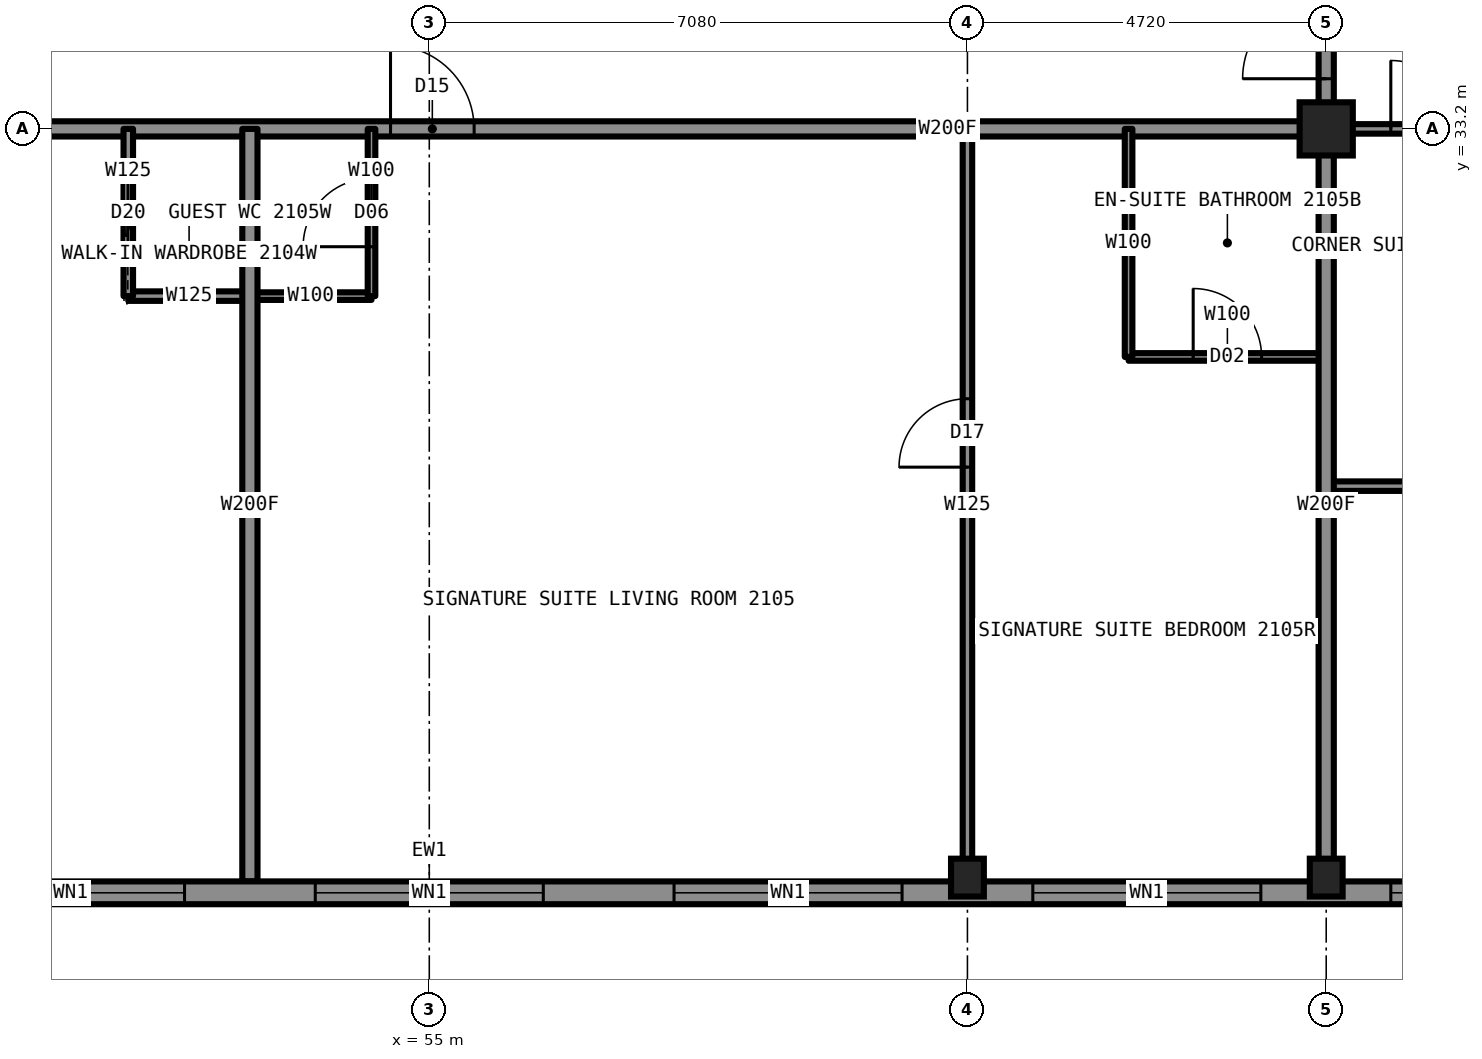
"""IFC4 building model, lengths in metres.
Left out: names, types, materials, properties, quantities, classifications, styles, units other than length and angle.
Written with IfcOpenShell. Run it as: python <this file> out.ifc"""

import sys

from ifc_helpers import new_model, si_unit, direction, frame, frame_2d, origin, origin_2d, place, context, subcontext, project, spatial, rectangle, hollow_rectangle, i_section, extrude, element, fill, save


model = new_model("IFC4")
c1 = context("Model", 3, precision=1e-05, world=origin(), true_north=direction((0.0, 1.0)))
c2 = subcontext(c1, "Body", "Model", "MODEL_VIEW")
j1 = project(units=[si_unit("LENGTHUNIT", "METRE"), si_unit("PLANEANGLEUNIT", "RADIAN")], contexts=[c1])
p1 = place(None, origin())
s1 = spatial("IfcSite", under=j1, at=p1, CompositionType="ELEMENT")
p2 = place(p1, origin())
s2 = spatial("IfcBuilding", under=s1, at=p2, CompositionType="ELEMENT")
p3 = place(p2, frame((0.0, 0.0, 81.0)))
s3 = spatial("IfcBuildingStorey", under=s2, at=p3, CompositionType="ELEMENT", Elevation=81.0)
for number, where, z_axis, x_axis in (
    (1, (62.08, 23.35, 0.0), (0.0, 0.0, 1.0), (1.0, 0.0, 0.0)),
    (2, (66.8, 23.35, 0.0), (0.0, 0.0, 1.0), (1.0, 0.0, 0.0)),
):
    element("IfcColumn", number, at=place(p3, frame(where, z_axis=z_axis, x_axis=x_axis)), inside=s3, PredefinedType="COLUMN", context=c2, shape_type="SweptSolid", body=[
        extrude(i_section(OverallWidth=0.432, OverallDepth=0.498, WebThickness=0.056, FlangeThickness=0.089, at=origin_2d()), origin(), (0.0, 0.0, 1.0), 3.5),
    ])
p4 = place(p3, frame((66.8, 33.2, 0.0), z_axis=(0.0, 0.0, 1.0), x_axis=(1.0, 0.0, 0.0)))
e3 = element("IfcColumn", 3, at=p4, inside=s3, PredefinedType="COLUMN", context=c2, shape_type="SweptSolid", body=[
    extrude(hollow_rectangle(XDim=0.7, YDim=0.7, WallThickness=0.06, at=origin_2d()), origin(), (0.0, 0.0, 1.0), 3.5),
])
p5 = place(p3, frame((43.2, 33.2, 0.0), z_axis=(0.0, 0.0, 1.0), x_axis=(1.0, 0.0, 0.0)))
e4 = element("IfcWall", 4, at=p5, inside=s3, PredefinedType="PARTITIONING", context=c2, shape_type="SweptSolid", body=[
    extrude(rectangle(XDim=23.6, YDim=0.2, at=frame_2d((11.8, 0.0))), origin(), (0.0, 0.0, 1.0), 3.33),
])
p6 = place(p5, frame((3.0, 0.0, 0.0)))
e5 = element("IfcOpeningElement", 5, at=p6, cuts=e4, PredefinedType="OPENING", context=c2, shape_type="SweptSolid", body=[
    extrude(rectangle(XDim=1.0, YDim=2.2, at=frame_2d((0.5, 1.1))), frame((0.0, 0.11, 0.0), z_axis=(0.0, -1.0, 0.0), x_axis=(1.0, 0.0, 0.0)), (0.0, 0.0, 1.0), 0.22),
])
p7 = place(p5, frame((11.29, 0.0, 0.0)))
e6 = element("IfcOpeningElement", 6, at=p7, cuts=e4, PredefinedType="OPENING", context=c2, shape_type="SweptSolid", body=[
    extrude(rectangle(XDim=1.1, YDim=2.2, at=frame_2d((0.55, 1.1))), frame((0.0, 0.11, 0.0), z_axis=(0.0, -1.0, 0.0), x_axis=(1.0, 0.0, 0.0)), (0.0, 0.0, 1.0), 0.22),
])
p8 = place(p3, frame((66.8, 33.2, 0.0), z_axis=(0.0, 0.0, 1.0), x_axis=(1.0, 0.0, 0.0)))
e7 = element("IfcWall", 7, at=p8, inside=s3, PredefinedType="PARTITIONING", context=c2, shape_type="SweptSolid", body=[
    extrude(rectangle(XDim=9.9, YDim=0.125, at=frame_2d((4.95, 0.0))), origin(), (0.0, 0.0, 1.0), 2.573),
])
p9 = place(p8, frame((0.85, 0.0, 0.0)))
e8 = element("IfcOpeningElement", 8, at=p9, cuts=e7, PredefinedType="OPENING", context=c2, shape_type="SweptSolid", body=[
    extrude(rectangle(XDim=0.9, YDim=2.2, at=frame_2d((0.45, 1.1))), frame((0.0, 0.073, 0.0), z_axis=(0.0, -1.0, 0.0), x_axis=(1.0, 0.0, 0.0)), (0.0, 0.0, 1.0), 0.145),
])
p10 = place(p3, frame((52.64, 31.0, 0.0), z_axis=(0.0, 0.0, 1.0), x_axis=(1.0, 0.0, 0.0)))
e9 = element("IfcWall", 9, at=p10, inside=s3, PredefinedType="PARTITIONING", context=c2, shape_type="SweptSolid", body=[
    extrude(rectangle(XDim=1.6, YDim=0.1, at=frame_2d((0.8, 0.0))), origin(), (0.0, 0.0, 1.0), 3.33),
])
p11 = place(p3, frame((51.04, 31.0, 0.0), z_axis=(0.0, 0.0, 1.0), x_axis=(1.0, 0.0, 0.0)))
e10 = element("IfcWall", 10, at=p11, inside=s3, PredefinedType="PARTITIONING", context=c2, shape_type="SweptSolid", body=[
    extrude(rectangle(XDim=1.6, YDim=0.125, at=frame_2d((0.8, 0.0))), origin(), (0.0, 0.0, 1.0), 3.33),
])
p12 = place(p3, frame((64.2, 30.2, 0.0), z_axis=(0.0, 0.0, 1.0), x_axis=(1.0, 0.0, 0.0)))
e11 = element("IfcWall", 11, at=p12, inside=s3, PredefinedType="PARTITIONING", context=c2, shape_type="SweptSolid", body=[
    extrude(rectangle(XDim=2.6, YDim=0.1, at=frame_2d((1.3, 0.0))), origin(), (0.0, 0.0, 1.0), 3.33),
])
p13 = place(p12, frame((0.85, 0.0, 0.0)))
e12 = element("IfcOpeningElement", 12, at=p13, cuts=e11, PredefinedType="OPENING", context=c2, shape_type="SweptSolid", body=[
    extrude(rectangle(XDim=0.9, YDim=2.1, at=frame_2d((0.45, 1.05))), frame((0.0, 0.06, 0.0), z_axis=(0.0, -1.0, 0.0), x_axis=(1.0, 0.0, 0.0)), (0.0, 0.0, 1.0), 0.12),
])
p14 = place(p3, frame((66.8, 28.5, 0.0), z_axis=(0.0, 0.0, 1.0), x_axis=(1.0, 0.0, 0.0)))
e13 = element("IfcWall", 13, at=p14, inside=s3, PredefinedType="PARTITIONING", context=c2, shape_type="SweptSolid", body=[
    extrude(rectangle(XDim=9.894, YDim=0.125, at=frame_2d((4.947, 0.0))), origin(), (0.0, 0.0, 1.0), 3.33),
])
p15 = place(p14, frame((1.75, 0.0, 0.0)))
e14 = element("IfcOpeningElement", 14, at=p15, cuts=e13, PredefinedType="OPENING", context=c2, shape_type="SweptSolid", body=[
    extrude(rectangle(XDim=0.9, YDim=2.2, at=frame_2d((0.45, 1.1))), frame((0.0, 0.073, 0.0), z_axis=(0.0, -1.0, 0.0), x_axis=(1.0, 0.0, 0.0)), (0.0, 0.0, 1.0), 0.145),
])
p16 = place(p3, frame((54.24, 31.0, 0.0), z_axis=(0.0, 0.0, 1.0), x_axis=(0.0, 1.0, 0.0)))
e15 = element("IfcWall", 15, at=p16, inside=s3, PredefinedType="PARTITIONING", context=c2, shape_type="SweptSolid", body=[
    extrude(rectangle(XDim=2.2, YDim=0.1, at=frame_2d((1.1, 0.0))), origin(), (0.0, 0.0, 1.0), 3.33),
])
p17 = place(p16, frame((0.65, 0.0, 0.0)))
e16 = element("IfcOpeningElement", 16, at=p17, cuts=e15, PredefinedType="OPENING", context=c2, shape_type="SweptSolid", body=[
    extrude(rectangle(XDim=0.9, YDim=2.1, at=frame_2d((0.45, 1.05))), frame((0.0, 0.06, 0.0), z_axis=(0.0, -1.0, 0.0), x_axis=(1.0, 0.0, 0.0)), (0.0, 0.0, 1.0), 0.12),
])
p18 = place(p3, frame((52.64, 23.3, 0.0), z_axis=(0.0, 0.0, 1.0), x_axis=(0.0, 1.0, 0.0)))
e17 = element("IfcWall", 17, at=p18, inside=s3, PredefinedType="PARTITIONING", context=c2, shape_type="SweptSolid", body=[
    extrude(rectangle(XDim=9.9, YDim=0.2, at=frame_2d((4.95, 0.0))), origin(), (0.0, 0.0, 1.0), 3.33),
])
p19 = place(p3, frame((51.04, 31.0, 0.0), z_axis=(0.0, 0.0, 1.0), x_axis=(0.0, 1.0, 0.0)))
e18 = element("IfcWall", 18, at=p19, inside=s3, PredefinedType="PARTITIONING", context=c2, shape_type="SweptSolid", body=[
    extrude(rectangle(XDim=2.2, YDim=0.125, at=frame_2d((1.1, 0.0))), origin(), (0.0, 0.0, 1.0), 3.33),
])
p20 = place(p19, frame((0.7, 0.0, 0.0)))
e19 = element("IfcOpeningElement", 19, at=p20, cuts=e18, PredefinedType="OPENING", context=c2, shape_type="SweptSolid", body=[
    extrude(rectangle(XDim=0.8, YDim=2.1, at=frame_2d((0.4, 1.05))), frame((0.0, 0.073, 0.0), z_axis=(0.0, -1.0, 0.0), x_axis=(1.0, 0.0, 0.0)), (0.0, 0.0, 1.0), 0.145),
])
p21 = place(p3, frame((66.8, 33.2, 0.0), z_axis=(0.0, 0.0, 1.0), x_axis=(0.0, 1.0, 0.0)))
e20 = element("IfcWall", 20, at=p21, inside=s3, PredefinedType="PARTITIONING", context=c2, shape_type="SweptSolid", body=[
    extrude(rectangle(XDim=23.6, YDim=0.2, at=frame_2d((11.8, 0.0))), origin(), (0.0, 0.0, 1.0), 3.33),
])
p22 = place(p21, frame((7.72, 0.0, 0.0)))
e21 = element("IfcOpeningElement", 21, at=p22, cuts=e20, PredefinedType="OPENING", context=c2, shape_type="SweptSolid", body=[
    extrude(rectangle(XDim=1.0, YDim=2.2, at=frame_2d((0.5, 1.1))), frame((0.0, 0.11, 0.0), z_axis=(0.0, -1.0, 0.0), x_axis=(1.0, 0.0, 0.0)), (0.0, 0.0, 1.0), 0.22),
])
p23 = place(p21, frame((16.42, 0.0, 0.0)))
e22 = element("IfcOpeningElement", 22, at=p23, cuts=e20, PredefinedType="OPENING", context=c2, shape_type="SweptSolid", body=[
    extrude(rectangle(XDim=1.0, YDim=2.2, at=frame_2d((0.5, 1.1))), frame((0.0, 0.11, 0.0), z_axis=(0.0, -1.0, 0.0), x_axis=(1.0, 0.0, 0.0)), (0.0, 0.0, 1.0), 0.22),
])
p24 = place(p21, frame((21.85, 0.0, 0.0)))
e23 = element("IfcOpeningElement", 23, at=p24, cuts=e20, PredefinedType="OPENING", context=c2, shape_type="SweptSolid", body=[
    extrude(rectangle(XDim=1.1, YDim=2.2, at=frame_2d((0.55, 1.1))), frame((0.0, 0.11, 0.0), z_axis=(0.0, -1.0, 0.0), x_axis=(1.0, 0.0, 0.0)), (0.0, 0.0, 1.0), 0.22),
])
p25 = place(p21, frame((0.66, 0.0, 0.0)))
e24 = element("IfcOpeningElement", 24, at=p25, cuts=e20, PredefinedType="OPENING", context=c2, shape_type="SweptSolid", body=[
    extrude(rectangle(XDim=1.1, YDim=2.2, at=frame_2d((0.55, 1.1))), frame((0.0, 0.11, 0.0), z_axis=(0.0, -1.0, 0.0), x_axis=(1.0, 0.0, 0.0)), (0.0, 0.0, 1.0), 0.22),
])
p26 = place(p3, frame((66.8, 23.3, 0.0), z_axis=(0.0, 0.0, 1.0), x_axis=(0.0, 1.0, 0.0)))
e25 = element("IfcWall", 25, at=p26, inside=s3, PredefinedType="PARTITIONING", context=c2, shape_type="SweptSolid", body=[
    extrude(rectangle(XDim=9.9, YDim=0.2, at=frame_2d((4.95, 0.0))), origin(), (0.0, 0.0, 1.0), 2.573),
])
p27 = place(p3, frame((62.08, 23.3, 0.0), z_axis=(0.0, 0.0, 1.0), x_axis=(0.0, 1.0, 0.0)))
e26 = element("IfcWall", 26, at=p27, inside=s3, PredefinedType="PARTITIONING", context=c2, shape_type="SweptSolid", body=[
    extrude(rectangle(XDim=9.9, YDim=0.125, at=frame_2d((4.95, 0.0))), origin(), (0.0, 0.0, 1.0), 2.573),
])
p28 = place(p27, frame((5.45, 0.0, 0.0)))
e27 = element("IfcOpeningElement", 27, at=p28, cuts=e26, PredefinedType="OPENING", context=c2, shape_type="SweptSolid", body=[
    extrude(rectangle(XDim=0.9, YDim=2.2, at=frame_2d((0.45, 1.1))), frame((0.0, 0.073, 0.0), z_axis=(0.0, -1.0, 0.0), x_axis=(1.0, 0.0, 0.0)), (0.0, 0.0, 1.0), 0.145),
])
p29 = place(p3, frame((64.2, 30.2, 0.0), z_axis=(0.0, 0.0, 1.0), x_axis=(0.0, 1.0, 0.0)))
e28 = element("IfcWall", 28, at=p29, inside=s3, PredefinedType="PARTITIONING", context=c2, shape_type="SweptSolid", body=[
    extrude(rectangle(XDim=3.0, YDim=0.1, at=frame_2d((1.5, 0.0))), origin(), (0.0, 0.0, 1.0), 3.33),
])
p30 = place(p3, frame((38.5, 23.15, 0.0), z_axis=(0.0, 0.0, 1.0), x_axis=(1.0, 0.0, 0.0)))
e29 = element("IfcWall", 29, at=p30, inside=s3, PredefinedType="SOLIDWALL", context=c2, shape_type="SweptSolid", body=[
    extrude(rectangle(XDim=33.0, YDim=0.3, at=frame_2d((16.5, 0.0))), origin(), (0.0, 0.0, 1.0), 2.63),
])
p31 = place(p30, frame((0.85, 0.0, 0.5)))
e30 = element("IfcOpeningElement", 30, at=p31, cuts=e29, PredefinedType="OPENING", context=c2, shape_type="SweptSolid", body=[
    extrude(rectangle(XDim=3.0, YDim=2.0, at=frame_2d((1.5, 1.0))), frame((0.0, 0.16, 0.0), z_axis=(0.0, -1.0, 0.0), x_axis=(1.0, 0.0, 0.0)), (0.0, 0.0, 1.0), 0.32),
])
p32 = place(p30, frame((5.56, 0.0, 0.5)))
e31 = element("IfcOpeningElement", 31, at=p32, cuts=e29, PredefinedType="OPENING", context=c2, shape_type="SweptSolid", body=[
    extrude(rectangle(XDim=3.0, YDim=2.0, at=frame_2d((1.5, 1.0))), frame((0.0, 0.16, 0.0), z_axis=(0.0, -1.0, 0.0), x_axis=(1.0, 0.0, 0.0)), (0.0, 0.0, 1.0), 0.32),
])
p33 = place(p30, frame((10.28, 0.0, 0.5)))
e32 = element("IfcOpeningElement", 32, at=p33, cuts=e29, PredefinedType="OPENING", context=c2, shape_type="SweptSolid", body=[
    extrude(rectangle(XDim=3.0, YDim=2.0, at=frame_2d((1.5, 1.0))), frame((0.0, 0.16, 0.0), z_axis=(0.0, -1.0, 0.0), x_axis=(1.0, 0.0, 0.0)), (0.0, 0.0, 1.0), 0.32),
])
p34 = place(p30, frame((15.0, 0.0, 0.5)))
e33 = element("IfcOpeningElement", 33, at=p34, cuts=e29, PredefinedType="OPENING", context=c2, shape_type="SweptSolid", body=[
    extrude(rectangle(XDim=3.0, YDim=2.0, at=frame_2d((1.5, 1.0))), frame((0.0, 0.16, 0.0), z_axis=(0.0, -1.0, 0.0), x_axis=(1.0, 0.0, 0.0)), (0.0, 0.0, 1.0), 0.32),
])
p35 = place(p30, frame((19.72, 0.0, 0.5)))
e34 = element("IfcOpeningElement", 34, at=p35, cuts=e29, PredefinedType="OPENING", context=c2, shape_type="SweptSolid", body=[
    extrude(rectangle(XDim=3.0, YDim=2.0, at=frame_2d((1.5, 1.0))), frame((0.0, 0.16, 0.0), z_axis=(0.0, -1.0, 0.0), x_axis=(1.0, 0.0, 0.0)), (0.0, 0.0, 1.0), 0.32),
])
p36 = place(p30, frame((24.44, 0.0, 0.5)))
e35 = element("IfcOpeningElement", 35, at=p36, cuts=e29, PredefinedType="OPENING", context=c2, shape_type="SweptSolid", body=[
    extrude(rectangle(XDim=3.0, YDim=2.0, at=frame_2d((1.5, 1.0))), frame((0.0, 0.16, 0.0), z_axis=(0.0, -1.0, 0.0), x_axis=(1.0, 0.0, 0.0)), (0.0, 0.0, 1.0), 0.32),
])
p37 = place(p30, frame((29.15, 0.0, 0.5)))
e36 = element("IfcOpeningElement", 36, at=p37, cuts=e29, PredefinedType="OPENING", context=c2, shape_type="SweptSolid", body=[
    extrude(rectangle(XDim=3.0, YDim=2.0, at=frame_2d((1.5, 1.0))), frame((0.0, 0.16, 0.0), z_axis=(0.0, -1.0, 0.0), x_axis=(1.0, 0.0, 0.0)), (0.0, 0.0, 1.0), 0.32),
])
p38 = place(p20, origin())
e37 = element("IfcDoor", 37, at=p38, inside=s3, OperationType="SLIDING_TO_LEFT", PredefinedType="DOOR", context=c2, shape_type="SweptSolid", body=[
    extrude(rectangle(XDim=0.8, YDim=2.1, at=frame_2d((0.4, 1.05))), frame((0.0, 0.025, 0.0), z_axis=(0.0, -1.0, 0.0), x_axis=(1.0, 0.0, 0.0)), (0.0, 0.0, 1.0), 0.05),
])
fill(e19, e37)
p39 = place(p7, origin())
e38 = element("IfcDoor", 38, at=p39, inside=s3, OperationType="SINGLE_SWING_LEFT", PredefinedType="DOOR", context=c2, shape_type="SweptSolid", body=[
    extrude(rectangle(XDim=1.1, YDim=2.2, at=frame_2d((0.55, 1.1))), frame((0.0, 0.025, 0.0), z_axis=(0.0, -1.0, 0.0), x_axis=(1.0, 0.0, 0.0)), (0.0, 0.0, 1.0), 0.05),
])
fill(e6, e38)
p40 = place(p13, origin())
e39 = element("IfcDoor", 39, at=p40, inside=s3, OperationType="SINGLE_SWING_RIGHT", PredefinedType="DOOR", context=c2, shape_type="SweptSolid", body=[
    extrude(rectangle(XDim=0.9, YDim=2.1, at=frame_2d((0.45, 1.05))), frame((0.0, 0.025, 0.0), z_axis=(0.0, -1.0, 0.0), x_axis=(1.0, 0.0, 0.0)), (0.0, 0.0, 1.0), 0.05),
])
fill(e12, e39)
p41 = place(p28, origin())
e40 = element("IfcDoor", 40, at=p41, inside=s3, OperationType="SINGLE_SWING_LEFT", PredefinedType="DOOR", context=c2, shape_type="SweptSolid", body=[
    extrude(rectangle(XDim=0.9, YDim=2.2, at=frame_2d((0.45, 1.1))), frame((0.0, 0.025, 0.0), z_axis=(0.0, -1.0, 0.0), x_axis=(1.0, 0.0, 0.0)), (0.0, 0.0, 1.0), 0.05),
])
fill(e27, e40)
p42 = place(p17, origin())
e41 = element("IfcDoor", 41, at=p42, inside=s3, OperationType="SINGLE_SWING_LEFT", PredefinedType="DOOR", context=c2, shape_type="SweptSolid", body=[
    extrude(rectangle(XDim=0.9, YDim=2.1, at=frame_2d((0.45, 1.05))), frame((0.0, 0.025, 0.0), z_axis=(0.0, -1.0, 0.0), x_axis=(1.0, 0.0, 0.0)), (0.0, 0.0, 1.0), 0.05),
])
fill(e16, e41)
p43 = place(p9, origin())
e42 = element("IfcDoor", 42, at=p43, inside=s3, OperationType="SINGLE_SWING_LEFT", PredefinedType="DOOR", context=c2, shape_type="SweptSolid", body=[
    extrude(rectangle(XDim=0.9, YDim=2.2, at=frame_2d((0.45, 1.1))), frame((0.0, 0.025, 0.0), z_axis=(0.0, -1.0, 0.0), x_axis=(1.0, 0.0, 0.0)), (0.0, 0.0, 1.0), 0.05),
])
fill(e8, e42)
p44 = place(p25, origin())
e43 = element("IfcDoor", 43, at=p44, inside=s3, OperationType="SINGLE_SWING_LEFT", PredefinedType="DOOR", context=c2, shape_type="SweptSolid", body=[
    extrude(rectangle(XDim=1.1, YDim=2.2, at=frame_2d((0.55, 1.1))), frame((0.0, 0.025, 0.0), z_axis=(0.0, -1.0, 0.0), x_axis=(1.0, 0.0, 0.0)), (0.0, 0.0, 1.0), 0.05),
])
fill(e24, e43)
p45 = place(p33, origin())
e44 = element("IfcWindow", 44, at=p45, inside=s3, PartitioningType="SINGLE_PANEL", PredefinedType="WINDOW", context=c2, shape_type="SweptSolid", body=[
    extrude(rectangle(XDim=3.0, YDim=2.0, at=frame_2d((1.5, 1.0))), frame((0.0, 0.03, 0.0), z_axis=(0.0, -1.0, 0.0), x_axis=(1.0, 0.0, 0.0)), (0.0, 0.0, 1.0), 0.06),
])
fill(e32, e44)
p46 = place(p34, origin())
e45 = element("IfcWindow", 45, at=p46, inside=s3, PartitioningType="SINGLE_PANEL", PredefinedType="WINDOW", context=c2, shape_type="SweptSolid", body=[
    extrude(rectangle(XDim=3.0, YDim=2.0, at=frame_2d((1.5, 1.0))), frame((0.0, 0.03, 0.0), z_axis=(0.0, -1.0, 0.0), x_axis=(1.0, 0.0, 0.0)), (0.0, 0.0, 1.0), 0.06),
])
fill(e33, e45)
p47 = place(p35, origin())
e46 = element("IfcWindow", 46, at=p47, inside=s3, PartitioningType="SINGLE_PANEL", PredefinedType="WINDOW", context=c2, shape_type="SweptSolid", body=[
    extrude(rectangle(XDim=3.0, YDim=2.0, at=frame_2d((1.5, 1.0))), frame((0.0, 0.03, 0.0), z_axis=(0.0, -1.0, 0.0), x_axis=(1.0, 0.0, 0.0)), (0.0, 0.0, 1.0), 0.06),
])
fill(e34, e46)
p48 = place(p36, origin())
e47 = element("IfcWindow", 47, at=p48, inside=s3, PartitioningType="SINGLE_PANEL", PredefinedType="WINDOW", context=c2, shape_type="SweptSolid", body=[
    extrude(rectangle(XDim=3.0, YDim=2.0, at=frame_2d((1.5, 1.0))), frame((0.0, 0.03, 0.0), z_axis=(0.0, -1.0, 0.0), x_axis=(1.0, 0.0, 0.0)), (0.0, 0.0, 1.0), 0.06),
])
fill(e35, e47)
p49 = place(p37, origin())
e48 = element("IfcWindow", 48, at=p49, inside=s3, PartitioningType="SINGLE_PANEL", PredefinedType="WINDOW", context=c2, shape_type="SweptSolid", body=[
    extrude(rectangle(XDim=3.0, YDim=2.0, at=frame_2d((1.5, 1.0))), frame((0.0, 0.03, 0.0), z_axis=(0.0, -1.0, 0.0), x_axis=(1.0, 0.0, 0.0)), (0.0, 0.0, 1.0), 0.06),
])
fill(e36, e48)
save(model, sys.argv[1])
